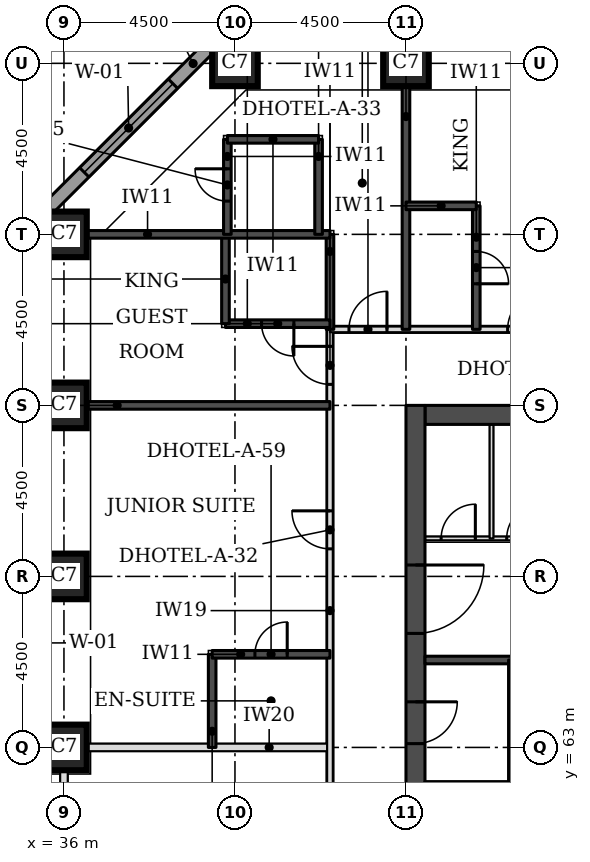
"""IFC4 building model, lengths in metres.
Left out: names, types, materials, properties, quantities, classifications, styles, units other than length and angle.
Written with IfcOpenShell. Run it as: python <this file> out.ifc"""

import sys

from ifc_helpers import new_model, si_unit, direction, frame, frame_2d, origin, origin_2d, place, context, subcontext, project, spatial, rectangle, extrude, element, fill, save


model = new_model("IFC4")
c1 = context("Model", 3, precision=1e-05, world=origin(), true_north=direction((0.0, 1.0)))
c2 = subcontext(c1, "Body", "Model", "MODEL_VIEW")
j1 = project(units=[si_unit("LENGTHUNIT", "METRE"), si_unit("PLANEANGLEUNIT", "RADIAN")], contexts=[c1])
p1 = place(None, origin())
s1 = spatial("IfcSite", under=j1, at=p1, CompositionType="ELEMENT")
p2 = place(p1, origin())
s2 = spatial("IfcBuilding", under=s1, at=p2, CompositionType="ELEMENT")
p3 = place(p2, frame((0.0, 0.0, 49.5)))
s3 = spatial("IfcBuildingStorey", under=s2, at=p3, CompositionType="ELEMENT", Elevation=49.5)
for number, where, z_axis, x_axis in (
    (1, (36.0, 63.0, 0.0), (0.0, 0.0, 1.0), (1.0, 0.0, 0.0)),
    (2, (36.0, 67.5, 0.0), (0.0, 0.0, 1.0), (1.0, 0.0, 0.0)),
    (3, (36.0, 72.0, 0.0), (0.0, 0.0, 1.0), (1.0, 0.0, 0.0)),
    (4, (36.0, 76.5, 0.0), (0.0, 0.0, 1.0), (1.0, 0.0, 0.0)),
    (5, (40.5, 81.0, 0.0), (0.0, 0.0, 1.0), (1.0, 0.0, 0.0)),
    (6, (45.0, 81.0, 0.0), (0.0, 0.0, 1.0), (1.0, 0.0, 0.0)),
):
    element("IfcColumn", number, at=place(p3, frame(where, z_axis=z_axis, x_axis=x_axis)), inside=s3, PredefinedType="COLUMN", context=c2, shape_type="SweptSolid", body=[
        extrude(rectangle(XDim=1.2, YDim=1.2, at=origin_2d()), origin(), (0.0, 0.0, 1.0), 3.3),
    ])
p4 = place(p3, frame((45.5, 71.75, 0.0), z_axis=(0.0, 0.0, 1.0), x_axis=(1.0, 0.0, 0.0)))
e7 = element("IfcWall", 7, at=p4, inside=s3, PredefinedType="SHEAR", context=c2, shape_type="SweptSolid", body=[
    extrude(rectangle(XDim=21.5, YDim=0.5, at=frame_2d((10.75, 0.0))), origin(), (0.0, 0.0, 1.0), 3.3),
])
p5 = place(p3, frame((45.25, 49.5, 0.0), z_axis=(0.0, 0.0, 1.0), x_axis=(0.0, 1.0, 0.0)))
e8 = element("IfcWall", 8, at=p5, inside=s3, PredefinedType="SHEAR", context=c2, shape_type="SweptSolid", body=[
    extrude(rectangle(XDim=22.5, YDim=0.5, at=frame_2d((11.25, 0.0))), origin(), (0.0, 0.0, 1.0), 3.3),
])
p6 = place(p5, frame((4.2, 0.0, 0.0)))
e9 = element("IfcOpeningElement", 9, at=p6, cuts=e8, PredefinedType="OPENING", context=c2, shape_type="SweptSolid", body=[
    extrude(rectangle(XDim=1.8, YDim=2.1, at=frame_2d((0.9, 1.05))), frame((0.0, 0.26, 0.0), z_axis=(0.0, -1.0, 0.0), x_axis=(1.0, 0.0, 0.0)), (0.0, 0.0, 1.0), 0.52),
])
p7 = place(p5, frame((6.9, 0.0, 0.0)))
e10 = element("IfcOpeningElement", 10, at=p7, cuts=e8, PredefinedType="OPENING", context=c2, shape_type="SweptSolid", body=[
    extrude(rectangle(XDim=1.1, YDim=2.1, at=frame_2d((0.55, 1.05))), frame((0.0, 0.26, 0.0), z_axis=(0.0, -1.0, 0.0), x_axis=(1.0, 0.0, 0.0)), (0.0, 0.0, 1.0), 0.52),
])
p8 = place(p5, frame((13.6, 0.0, 0.0)))
e11 = element("IfcOpeningElement", 11, at=p8, cuts=e8, PredefinedType="OPENING", context=c2, shape_type="SweptSolid", body=[
    extrude(rectangle(XDim=1.1, YDim=2.1, at=frame_2d((0.55, 1.05))), frame((0.0, 0.26, 0.0), z_axis=(0.0, -1.0, 0.0), x_axis=(1.0, 0.0, 0.0)), (0.0, 0.0, 1.0), 0.52),
])
p9 = place(p5, frame((16.5, 0.0, 0.0)))
e12 = element("IfcOpeningElement", 12, at=p9, cuts=e8, PredefinedType="OPENING", context=c2, shape_type="SweptSolid", body=[
    extrude(rectangle(XDim=1.8, YDim=2.1, at=frame_2d((0.9, 1.05))), frame((0.0, 0.26, 0.0), z_axis=(0.0, -1.0, 0.0), x_axis=(1.0, 0.0, 0.0)), (0.0, 0.0, 1.0), 0.52),
])
p10 = place(p3, frame((40.23, 81.826, 0.0), z_axis=(0.0, 0.0, 1.0), x_axis=(-0.707106781187, -0.707106781187, 0.0)))
e13 = element("IfcWall", 13, at=p10, inside=s3, PredefinedType="STANDARD", context=c2, shape_type="SweptSolid", body=[
    extrude(rectangle(XDim=7.151, YDim=0.35, at=frame_2d((3.576, 0.0))), origin(), (0.0, 0.0, 1.0), 3.055),
])
p11 = place(p10, frame((1.926, 0.0, 0.8)))
e14 = element("IfcOpeningElement", 14, at=p11, cuts=e13, PredefinedType="OPENING", context=c2, shape_type="SweptSolid", body=[
    extrude(rectangle(XDim=3.3, YDim=1.5, at=frame_2d((1.65, 0.75))), frame((0.0, 0.185, 0.0), z_axis=(0.0, -1.0, 0.0), x_axis=(1.0, 0.0, 0.0)), (0.0, 0.0, 1.0), 0.37),
])
p12 = place(p3, frame((36.0, 56.0, 0.0), z_axis=(0.0, 0.0, 1.0), x_axis=(0.0, 1.0, 0.0)))
e15 = element("IfcWall", 15, at=p12, inside=s3, PredefinedType="PARTITIONING", context=c2, shape_type="SweptSolid", body=[
    extrude(rectangle(XDim=6.4, YDim=0.2, at=frame_2d((3.2, 0.0))), origin(), (0.0, 0.0, 1.0), 2.33),
])
p13 = place(p3, frame((36.6, 63.0, 0.0), z_axis=(0.0, 0.0, 1.0), x_axis=(1.0, 0.0, 0.0)))
e16 = element("IfcWall", 16, at=p13, inside=s3, PredefinedType="PARTITIONING", context=c2, shape_type="SweptSolid", body=[
    extrude(rectangle(XDim=6.4, YDim=0.2, at=frame_2d((3.2, 0.0))), origin(), (0.0, 0.0, 1.0), 3.08),
])
p14 = place(p3, frame((43.0, 56.0, 0.0), z_axis=(0.0, 0.0, 1.0), x_axis=(0.0, 1.0, 0.0)))
e17 = element("IfcWall", 17, at=p14, inside=s3, PredefinedType="PARTITIONING", context=c2, shape_type="SweptSolid", body=[
    extrude(rectangle(XDim=18.0, YDim=0.15, at=frame_2d((9.0, 0.0))), origin(), (0.0, 0.0, 1.0), 3.08),
])
p15 = place(p14, frame((12.225, 0.0, 0.0)))
e18 = element("IfcOpeningElement", 18, at=p15, cuts=e17, PredefinedType="OPENING", context=c2, shape_type="SweptSolid", body=[
    extrude(rectangle(XDim=1.0, YDim=2.1, at=frame_2d((0.5, 1.05))), frame((0.0, 0.085, 0.0), z_axis=(0.0, -1.0, 0.0), x_axis=(1.0, 0.0, 0.0)), (0.0, 0.0, 1.0), 0.17),
])
p16 = place(p14, frame((16.553, 0.0, 0.0)))
e19 = element("IfcOpeningElement", 19, at=p16, cuts=e17, PredefinedType="OPENING", context=c2, shape_type="SweptSolid", body=[
    extrude(rectangle(XDim=1.0, YDim=2.1, at=frame_2d((0.5, 1.05))), frame((0.0, 0.085, 0.0), z_axis=(0.0, -1.0, 0.0), x_axis=(1.0, 0.0, 0.0)), (0.0, 0.0, 1.0), 0.17),
])
p17 = place(p14, frame((3.05, 0.0, 0.0)))
e20 = element("IfcOpeningElement", 20, at=p17, cuts=e17, PredefinedType="OPENING", context=c2, shape_type="SweptSolid", body=[
    extrude(rectangle(XDim=0.9, YDim=2.1, at=frame_2d((0.45, 1.05))), frame((0.0, 0.085, 0.0), z_axis=(0.0, -1.0, 0.0), x_axis=(1.0, 0.0, 0.0)), (0.0, 0.0, 1.0), 0.17),
])
p18 = place(p3, frame((43.0, 74.0, 0.0), z_axis=(0.0, 0.0, 1.0), x_axis=(1.0, 0.0, 0.0)))
e21 = element("IfcWall", 21, at=p18, inside=s3, PredefinedType="PARTITIONING", context=c2, shape_type="SweptSolid", body=[
    extrude(rectangle(XDim=26.5, YDim=0.15, at=frame_2d((13.25, 0.0))), origin(), (0.0, 0.0, 1.0), 3.08),
])
p19 = place(p18, frame((4.675, 0.0, 0.0)))
e22 = element("IfcOpeningElement", 22, at=p19, cuts=e21, PredefinedType="OPENING", context=c2, shape_type="SweptSolid", body=[
    extrude(rectangle(XDim=1.0, YDim=2.1, at=frame_2d((0.5, 1.05))), frame((0.0, 0.085, 0.0), z_axis=(0.0, -1.0, 0.0), x_axis=(1.0, 0.0, 0.0)), (0.0, 0.0, 1.0), 0.17),
])
p20 = place(p18, frame((9.025, 0.0, 0.0)))
e23 = element("IfcOpeningElement", 23, at=p20, cuts=e21, PredefinedType="OPENING", context=c2, shape_type="SweptSolid", body=[
    extrude(rectangle(XDim=1.0, YDim=2.1, at=frame_2d((0.5, 1.05))), frame((0.0, 0.085, 0.0), z_axis=(0.0, -1.0, 0.0), x_axis=(1.0, 0.0, 0.0)), (0.0, 0.0, 1.0), 0.17),
])
p21 = place(p18, frame((20.725, 0.0, 0.0)))
e24 = element("IfcOpeningElement", 24, at=p21, cuts=e21, PredefinedType="OPENING", context=c2, shape_type="SweptSolid", body=[
    extrude(rectangle(XDim=1.0, YDim=2.1, at=frame_2d((0.5, 1.05))), frame((0.0, 0.085, 0.0), z_axis=(0.0, -1.0, 0.0), x_axis=(1.0, 0.0, 0.0)), (0.0, 0.0, 1.0), 0.17),
])
p22 = place(p18, frame((0.5, 0.0, 0.0)))
e25 = element("IfcOpeningElement", 25, at=p22, cuts=e21, PredefinedType="OPENING", context=c2, shape_type="SweptSolid", body=[
    extrude(rectangle(XDim=1.0, YDim=2.1, at=frame_2d((0.5, 1.05))), frame((0.0, 0.085, 0.0), z_axis=(0.0, -1.0, 0.0), x_axis=(1.0, 0.0, 0.0)), (0.0, 0.0, 1.0), 0.17),
])
p23 = place(p18, frame((25.0, 0.0, 0.0)))
e26 = element("IfcOpeningElement", 26, at=p23, cuts=e21, PredefinedType="OPENING", context=c2, shape_type="SweptSolid", body=[
    extrude(rectangle(XDim=1.0, YDim=2.1, at=frame_2d((0.5, 1.05))), frame((0.0, 0.085, 0.0), z_axis=(0.0, -1.0, 0.0), x_axis=(1.0, 0.0, 0.0)), (0.0, 0.0, 1.0), 0.17),
])
p24 = place(p3, frame((39.9, 63.0, 0.0), z_axis=(0.0, 0.0, 1.0), x_axis=(0.0, 1.0, 0.0)))
e27 = element("IfcWall", 27, at=p24, inside=s3, PredefinedType="SOLIDWALL", context=c2, shape_type="SweptSolid", body=[
    extrude(rectangle(XDim=2.45, YDim=0.2, at=frame_2d((1.225, 0.0))), origin(), (0.0, 0.0, 1.0), 3.08),
])
p25 = place(p3, frame((39.9, 65.45, 0.0), z_axis=(0.0, 0.0, 1.0), x_axis=(1.0, 0.0, 0.0)))
e28 = element("IfcWall", 28, at=p25, inside=s3, PredefinedType="SOLIDWALL", context=c2, shape_type="SweptSolid", body=[
    extrude(rectangle(XDim=3.1, YDim=0.2, at=frame_2d((1.55, 0.0))), origin(), (0.0, 0.0, 1.0), 3.08),
])
p26 = place(p25, frame((1.125, 0.0, 0.0)))
e29 = element("IfcOpeningElement", 29, at=p26, cuts=e28, PredefinedType="OPENING", context=c2, shape_type="SweptSolid", body=[
    extrude(rectangle(XDim=0.85, YDim=2.1, at=frame_2d((0.425, 1.05))), frame((0.0, 0.11, 0.0), z_axis=(0.0, -1.0, 0.0), x_axis=(1.0, 0.0, 0.0)), (0.0, 0.0, 1.0), 0.22),
])
p27 = place(p3, frame((36.6, 72.0, 0.0), z_axis=(0.0, 0.0, 1.0), x_axis=(1.0, 0.0, 0.0)))
e30 = element("IfcWall", 30, at=p27, inside=s3, PredefinedType="SOLIDWALL", context=c2, shape_type="SweptSolid", body=[
    extrude(rectangle(XDim=6.4, YDim=0.2, at=frame_2d((3.2, 0.0))), origin(), (0.0, 0.0, 1.0), 3.08),
])
p28 = place(p3, frame((43.0, 74.0, 0.0), z_axis=(0.0, 0.0, 1.0), x_axis=(0.0, 1.0, 0.0)))
e31 = element("IfcWall", 31, at=p28, inside=s3, PredefinedType="SOLIDWALL", context=c2, shape_type="SweptSolid", body=[
    extrude(rectangle(XDim=2.5, YDim=0.2, at=frame_2d((1.25, 0.0))), origin(), (0.0, 0.0, 1.0), 3.08),
])
p29 = place(p3, frame((45.0, 74.0, 0.0), z_axis=(0.0, 0.0, 1.0), x_axis=(0.0, 1.0, 0.0)))
e32 = element("IfcWall", 32, at=p29, inside=s3, PredefinedType="SOLIDWALL", context=c2, shape_type="SweptSolid", body=[
    extrude(rectangle(XDim=6.4, YDim=0.2, at=frame_2d((3.2, 0.0))), origin(), (0.0, 0.0, 1.0), 3.08),
])
p30 = place(p3, frame((46.85, 74.0, 0.0), z_axis=(0.0, 0.0, 1.0), x_axis=(0.0, 1.0, 0.0)))
e33 = element("IfcWall", 33, at=p30, inside=s3, PredefinedType="SOLIDWALL", context=c2, shape_type="SweptSolid", body=[
    extrude(rectangle(XDim=3.25, YDim=0.2, at=frame_2d((1.625, 0.0))), origin(), (0.0, 0.0, 1.0), 3.08),
])
p31 = place(p30, frame((1.2, 0.0, 0.0)))
e34 = element("IfcOpeningElement", 34, at=p31, cuts=e33, PredefinedType="OPENING", context=c2, shape_type="SweptSolid", body=[
    extrude(rectangle(XDim=0.85, YDim=2.1, at=frame_2d((0.425, 1.05))), frame((0.0, 0.11, 0.0), z_axis=(0.0, -1.0, 0.0), x_axis=(1.0, 0.0, 0.0)), (0.0, 0.0, 1.0), 0.22),
])
p32 = place(p3, frame((40.25, 74.15, 0.0), z_axis=(0.0, 0.0, 1.0), x_axis=(1.0, 0.0, 0.0)))
e35 = element("IfcWall", 35, at=p32, inside=s3, PredefinedType="SOLIDWALL", context=c2, shape_type="SweptSolid", body=[
    extrude(rectangle(XDim=2.75, YDim=0.2, at=frame_2d((1.375, 0.0))), origin(), (0.0, 0.0, 1.0), 3.08),
])
p33 = place(p32, frame((0.95, 0.0, 0.0)))
e36 = element("IfcOpeningElement", 36, at=p33, cuts=e35, PredefinedType="OPENING", context=c2, shape_type="SweptSolid", body=[
    extrude(rectangle(XDim=0.85, YDim=2.1, at=frame_2d((0.425, 1.05))), frame((0.0, 0.11, 0.0), z_axis=(0.0, -1.0, 0.0), x_axis=(1.0, 0.0, 0.0)), (0.0, 0.0, 1.0), 0.22),
])
p34 = place(p3, frame((40.25, 74.15, 0.0), z_axis=(0.0, 0.0, 1.0), x_axis=(0.0, 1.0, 0.0)))
e37 = element("IfcWall", 37, at=p34, inside=s3, PredefinedType="SOLIDWALL", context=c2, shape_type="SweptSolid", body=[
    extrude(rectangle(XDim=2.35, YDim=0.2, at=frame_2d((1.175, 0.0))), origin(), (0.0, 0.0, 1.0), 3.08),
])
p35 = place(p3, frame((36.6, 76.5, 0.0), z_axis=(0.0, 0.0, 1.0), x_axis=(1.0, 0.0, 0.0)))
e38 = element("IfcWall", 38, at=p35, inside=s3, PredefinedType="SOLIDWALL", context=c2, shape_type="SweptSolid", body=[
    extrude(rectangle(XDim=6.4, YDim=0.2, at=frame_2d((3.2, 0.0))), origin(), (0.0, 0.0, 1.0), 3.08),
])
p36 = place(p3, frame((40.3, 76.5, 0.0), z_axis=(0.0, 0.0, 1.0), x_axis=(0.0, 1.0, 0.0)))
e39 = element("IfcWall", 39, at=p36, inside=s3, PredefinedType="SOLIDWALL", context=c2, shape_type="SweptSolid", body=[
    extrude(rectangle(XDim=2.5, YDim=0.2, at=frame_2d((1.25, 0.0))), origin(), (0.0, 0.0, 1.0), 3.08),
])
p37 = place(p36, frame((0.875, 0.0, 0.0)))
e40 = element("IfcOpeningElement", 40, at=p37, cuts=e39, PredefinedType="OPENING", context=c2, shape_type="SweptSolid", body=[
    extrude(rectangle(XDim=0.85, YDim=2.1, at=frame_2d((0.425, 1.05))), frame((0.0, 0.11, 0.0), z_axis=(0.0, -1.0, 0.0), x_axis=(1.0, 0.0, 0.0)), (0.0, 0.0, 1.0), 0.22),
])
p38 = place(p3, frame((42.7, 76.5, 0.0), z_axis=(0.0, 0.0, 1.0), x_axis=(0.0, 1.0, 0.0)))
e41 = element("IfcWall", 41, at=p38, inside=s3, PredefinedType="SOLIDWALL", context=c2, shape_type="SweptSolid", body=[
    extrude(rectangle(XDim=2.5, YDim=0.2, at=frame_2d((1.25, 0.0))), origin(), (0.0, 0.0, 1.0), 3.08),
])
p39 = place(p3, frame((45.0, 77.25, 0.0), z_axis=(0.0, 0.0, 1.0), x_axis=(1.0, 0.0, 0.0)))
e42 = element("IfcWall", 42, at=p39, inside=s3, PredefinedType="SOLIDWALL", context=c2, shape_type="SweptSolid", body=[
    extrude(rectangle(XDim=1.85, YDim=0.2, at=frame_2d((0.925, 0.0))), origin(), (0.0, 0.0, 1.0), 3.08),
])
p40 = place(p3, frame((40.3, 79.0, 0.0), z_axis=(0.0, 0.0, 1.0), x_axis=(1.0, 0.0, 0.0)))
e43 = element("IfcWall", 43, at=p40, inside=s3, PredefinedType="SOLIDWALL", context=c2, shape_type="SweptSolid", body=[
    extrude(rectangle(XDim=2.4, YDim=0.2, at=frame_2d((1.2, 0.0))), origin(), (0.0, 0.0, 1.0), 3.08),
])
p41 = place(p3, frame((45.5, 65.3, 0.0), z_axis=(0.0, 0.0, 1.0), x_axis=(1.0, 0.0, 0.0)))
e44 = element("IfcWall", 44, at=p41, inside=s3, PredefinedType="SOLIDWALL", context=c2, shape_type="SweptSolid", body=[
    extrude(rectangle(XDim=2.3, YDim=0.2, at=frame_2d((1.15, 0.0))), origin(), (0.0, 0.0, 1.0), 3.08),
])
p42 = place(p3, frame((45.5, 68.5, 0.0), z_axis=(0.0, 0.0, 1.0), x_axis=(1.0, 0.0, 0.0)))
e45 = element("IfcWall", 45, at=p42, inside=s3, PredefinedType="PARTITIONING", context=c2, shape_type="SweptSolid", body=[
    extrude(rectangle(XDim=5.15, YDim=0.1, at=frame_2d((2.575, 0.0))), origin(), (0.0, 0.0, 1.0), 3.08),
])
p43 = place(p42, frame((0.426, 0.0, 0.0)))
e46 = element("IfcOpeningElement", 46, at=p43, cuts=e45, PredefinedType="OPENING", context=c2, shape_type="SweptSolid", body=[
    extrude(rectangle(XDim=0.9, YDim=2.1, at=frame_2d((0.45, 1.05))), frame((0.0, 0.06, 0.0), z_axis=(0.0, -1.0, 0.0), x_axis=(1.0, 0.0, 0.0)), (0.0, 0.0, 1.0), 0.12),
])
p44 = place(p42, frame((2.151, 0.0, 0.0)))
e47 = element("IfcOpeningElement", 47, at=p44, cuts=e45, PredefinedType="OPENING", context=c2, shape_type="SweptSolid", body=[
    extrude(rectangle(XDim=0.9, YDim=2.1, at=frame_2d((0.45, 1.05))), frame((0.0, 0.06, 0.0), z_axis=(0.0, -1.0, 0.0), x_axis=(1.0, 0.0, 0.0)), (0.0, 0.0, 1.0), 0.12),
])
p45 = place(p42, frame((3.85, 0.0, 0.0)))
e48 = element("IfcOpeningElement", 48, at=p45, cuts=e45, PredefinedType="OPENING", context=c2, shape_type="SweptSolid", body=[
    extrude(rectangle(XDim=0.9, YDim=2.1, at=frame_2d((0.45, 1.05))), frame((0.0, 0.06, 0.0), z_axis=(0.0, -1.0, 0.0), x_axis=(1.0, 0.0, 0.0)), (0.0, 0.0, 1.0), 0.12),
])
p46 = place(p3, frame((47.251, 68.5, 0.0), z_axis=(0.0, 0.0, 1.0), x_axis=(0.0, 1.0, 0.0)))
e49 = element("IfcWall", 49, at=p46, inside=s3, PredefinedType="PARTITIONING", context=c2, shape_type="SweptSolid", body=[
    extrude(rectangle(XDim=3.0, YDim=0.1, at=frame_2d((1.5, 0.0))), origin(), (0.0, 0.0, 1.0), 3.08),
])
p47 = place(p3, frame((47.8, 62.0, 0.0), z_axis=(0.0, 0.0, 1.0), x_axis=(0.0, 1.0, 0.0)))
e50 = element("IfcWall", 50, at=p47, inside=s3, PredefinedType="SOLIDWALL", context=c2, shape_type="SweptSolid", body=[
    extrude(rectangle(XDim=3.3, YDim=0.2, at=frame_2d((1.65, 0.0))), origin(), (0.0, 0.0, 1.0), 3.08),
])
p48 = place(p47, frame((1.1, 0.0, 0.0)))
e51 = element("IfcOpeningElement", 51, at=p48, cuts=e50, PredefinedType="OPENING", context=c2, shape_type="SweptSolid", body=[
    extrude(rectangle(XDim=1.1, YDim=2.1, at=frame_2d((0.55, 1.05))), frame((0.0, 0.11, 0.0), z_axis=(0.0, -1.0, 0.0), x_axis=(1.0, 0.0, 0.0)), (0.0, 0.0, 1.0), 0.22),
])
p49 = place(p11, origin())
e52 = element("IfcWindow", 52, at=p49, inside=s3, PartitioningType="SINGLE_PANEL", PredefinedType="WINDOW", context=c2, shape_type="SweptSolid", body=[
    extrude(rectangle(XDim=3.3, YDim=1.5, at=frame_2d((1.65, 0.75))), frame((0.0, 0.085, 0.0), z_axis=(0.0, -1.0, 0.0), x_axis=(1.0, 0.0, 0.0)), (0.0, 0.0, 1.0), 0.06),
])
fill(e14, e52)
p50 = place(p15, origin())
e53 = element("IfcDoor", 53, at=p50, inside=s3, OperationType="SINGLE_SWING_RIGHT", PredefinedType="DOOR", context=c2, shape_type="SweptSolid", body=[
    extrude(rectangle(XDim=1.0, YDim=2.1, at=frame_2d((0.5, 1.05))), frame((0.0, 0.025, 0.0), z_axis=(0.0, -1.0, 0.0), x_axis=(1.0, 0.0, 0.0)), (0.0, 0.0, 1.0), 0.05),
])
fill(e18, e53)
p51 = place(p26, origin())
e54 = element("IfcDoor", 54, at=p51, inside=s3, OperationType="SINGLE_SWING_RIGHT", PredefinedType="DOOR", context=c2, shape_type="SweptSolid", body=[
    extrude(rectangle(XDim=0.85, YDim=2.1, at=frame_2d((0.425, 1.05))), frame((0.0, 0.025, 0.0), z_axis=(0.0, -1.0, 0.0), x_axis=(1.0, 0.0, 0.0)), (0.0, 0.0, 1.0), 0.05),
])
fill(e29, e54)
p52 = place(p16, origin())
e55 = element("IfcDoor", 55, at=p52, inside=s3, OperationType="SINGLE_SWING_RIGHT", PredefinedType="DOOR", context=c2, shape_type="SweptSolid", body=[
    extrude(rectangle(XDim=1.0, YDim=2.1, at=frame_2d((0.5, 1.05))), frame((0.0, 0.025, 0.0), z_axis=(0.0, -1.0, 0.0), x_axis=(1.0, 0.0, 0.0)), (0.0, 0.0, 1.0), 0.05),
])
fill(e19, e55)
p53 = place(p33, frame((0.85, 0.0, 0.0), z_axis=(0.0, 0.0, 1.0), x_axis=(-1.0, 0.0, 0.0)))
e56 = element("IfcDoor", 56, at=p53, inside=s3, OperationType="SINGLE_SWING_LEFT", PredefinedType="DOOR", context=c2, shape_type="SweptSolid", body=[
    extrude(rectangle(XDim=0.85, YDim=2.1, at=frame_2d((0.425, 1.05))), frame((0.0, 0.025, 0.0), z_axis=(0.0, -1.0, 0.0), x_axis=(1.0, 0.0, 0.0)), (0.0, 0.0, 1.0), 0.05),
])
fill(e36, e56)
p54 = place(p19, origin())
e57 = element("IfcDoor", 57, at=p54, inside=s3, OperationType="SINGLE_SWING_RIGHT", PredefinedType="DOOR", context=c2, shape_type="SweptSolid", body=[
    extrude(rectangle(XDim=1.0, YDim=2.1, at=frame_2d((0.5, 1.05))), frame((0.0, 0.025, 0.0), z_axis=(0.0, -1.0, 0.0), x_axis=(1.0, 0.0, 0.0)), (0.0, 0.0, 1.0), 0.05),
])
fill(e22, e57)
p55 = place(p31, frame((0.85, 0.0, 0.0), z_axis=(0.0, 0.0, 1.0), x_axis=(-1.0, 0.0, 0.0)))
e58 = element("IfcDoor", 58, at=p55, inside=s3, OperationType="SINGLE_SWING_RIGHT", PredefinedType="DOOR", context=c2, shape_type="SweptSolid", body=[
    extrude(rectangle(XDim=0.85, YDim=2.1, at=frame_2d((0.425, 1.05))), frame((0.0, 0.025, 0.0), z_axis=(0.0, -1.0, 0.0), x_axis=(1.0, 0.0, 0.0)), (0.0, 0.0, 1.0), 0.05),
])
fill(e34, e58)
p56 = place(p22, origin())
e59 = element("IfcDoor", 59, at=p56, inside=s3, OperationType="SINGLE_SWING_RIGHT", PredefinedType="DOOR", context=c2, shape_type="SweptSolid", body=[
    extrude(rectangle(XDim=1.0, YDim=2.1, at=frame_2d((0.5, 1.05))), frame((0.0, 0.025, 0.0), z_axis=(0.0, -1.0, 0.0), x_axis=(1.0, 0.0, 0.0)), (0.0, 0.0, 1.0), 0.05),
])
fill(e25, e59)
p57 = place(p37, origin())
e60 = element("IfcDoor", 60, at=p57, inside=s3, OperationType="SINGLE_SWING_RIGHT", PredefinedType="DOOR", context=c2, shape_type="SweptSolid", body=[
    extrude(rectangle(XDim=0.85, YDim=2.1, at=frame_2d((0.425, 1.05))), frame((0.0, 0.025, 0.0), z_axis=(0.0, -1.0, 0.0), x_axis=(1.0, 0.0, 0.0)), (0.0, 0.0, 1.0), 0.05),
])
fill(e40, e60)
p58 = place(p8, frame((1.1, 0.0, 0.0), z_axis=(0.0, 0.0, 1.0), x_axis=(-1.0, 0.0, 0.0)))
e61 = element("IfcDoor", 61, at=p58, inside=s3, OperationType="SINGLE_SWING_LEFT", PredefinedType="DOOR", context=c2, shape_type="SweptSolid", body=[
    extrude(rectangle(XDim=1.1, YDim=2.1, at=frame_2d((0.55, 1.05))), frame((0.0, 0.025, 0.0), z_axis=(0.0, -1.0, 0.0), x_axis=(1.0, 0.0, 0.0)), (0.0, 0.0, 1.0), 0.05),
])
fill(e11, e61)
p59 = place(p9, frame((1.8, 0.0, 0.0), z_axis=(0.0, 0.0, 1.0), x_axis=(-1.0, 0.0, 0.0)))
e62 = element("IfcDoor", 62, at=p59, inside=s3, OperationType="SINGLE_SWING_LEFT", PredefinedType="DOOR", context=c2, shape_type="SweptSolid", body=[
    extrude(rectangle(XDim=1.8, YDim=2.1, at=frame_2d((0.9, 1.05))), frame((0.0, 0.025, 0.0), z_axis=(0.0, -1.0, 0.0), x_axis=(1.0, 0.0, 0.0)), (0.0, 0.0, 1.0), 0.05),
])
fill(e12, e62)
p60 = place(p43, origin())
e63 = element("IfcDoor", 63, at=p60, inside=s3, OperationType="SINGLE_SWING_RIGHT", PredefinedType="DOOR", context=c2, shape_type="SweptSolid", body=[
    extrude(rectangle(XDim=0.9, YDim=2.1, at=frame_2d((0.45, 1.05))), frame((0.0, 0.025, 0.0), z_axis=(0.0, -1.0, 0.0), x_axis=(1.0, 0.0, 0.0)), (0.0, 0.0, 1.0), 0.05),
])
fill(e46, e63)
p61 = place(p44, origin())
e64 = element("IfcDoor", 64, at=p61, inside=s3, OperationType="SINGLE_SWING_RIGHT", PredefinedType="DOOR", context=c2, shape_type="SweptSolid", body=[
    extrude(rectangle(XDim=0.9, YDim=2.1, at=frame_2d((0.45, 1.05))), frame((0.0, 0.025, 0.0), z_axis=(0.0, -1.0, 0.0), x_axis=(1.0, 0.0, 0.0)), (0.0, 0.0, 1.0), 0.05),
])
fill(e47, e64)
save(model, sys.argv[1])
